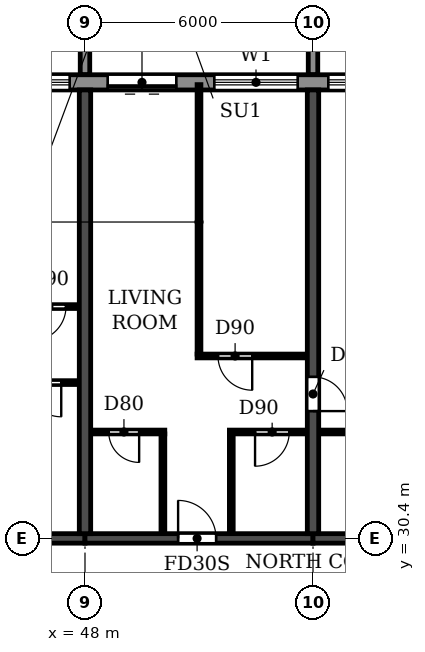
"""IFC4 building model, lengths in metres.
Left out: names, types, materials, properties, quantities, classifications, styles, units other than length and angle.
Written with IfcOpenShell. Run it as: python <this file> out.ifc"""

import sys

from ifc_helpers import new_model, si_unit, direction, frame, frame_2d, origin, place, context, subcontext, project, spatial, polyline, rectangle, outline, extrude, source, transform, mapped, element, fill, save


model = new_model("IFC4")
c1 = context("Model", 3, precision=1e-05, world=origin(), true_north=direction((0.0, 1.0)))
c2 = subcontext(c1, "Body", "Model", "MODEL_VIEW")
j1 = project(units=[si_unit("LENGTHUNIT", "METRE"), si_unit("PLANEANGLEUNIT", "RADIAN")], contexts=[c1])
p1 = place(None, origin())
s1 = spatial("IfcSite", under=j1, at=p1, CompositionType="ELEMENT")
p2 = place(p1, origin())
s2 = spatial("IfcBuilding", under=s1, at=p2, CompositionType="ELEMENT")
p3 = place(p2, frame((0.0, 0.0, 155.4)))
s3 = spatial("IfcBuildingStorey", under=s2, at=p3, CompositionType="ELEMENT", Elevation=155.4)
p4 = place(p3, frame((48.0, 30.525, 0.0), z_axis=(0.0, 0.0, 1.0), x_axis=(0.0, 1.0, 0.0)))
e1 = element("IfcWall", 1, at=p4, inside=s3, PredefinedType="SHEAR", context=c2, shape_type="SweptSolid", body=[
    extrude(rectangle(XDim=11.675, YDim=0.3, at=frame_2d((5.837, 0.0))), origin(), (0.0, 0.0, 1.0), 3.0),
])
p5 = place(p3, frame((54.0, 30.525, 0.0), z_axis=(0.0, 0.0, 1.0), x_axis=(0.0, 1.0, 0.0)))
e2 = element("IfcWall", 2, at=p5, inside=s3, PredefinedType="SHEAR", context=c2, shape_type="SweptSolid", body=[
    extrude(rectangle(XDim=11.675, YDim=0.3, at=frame_2d((5.837, 0.0))), origin(), (0.0, 0.0, 1.0), 3.0),
])
p6 = place(p5, frame((3.225, 0.0, 0.0)))
e3 = element("IfcOpeningElement", 3, at=p6, cuts=e2, PredefinedType="OPENING", context=c2, shape_type="SweptSolid", body=[
    extrude(rectangle(XDim=0.9, YDim=2.1, at=frame_2d((0.45, 1.05))), frame((0.0, 0.16, 0.0), z_axis=(0.0, -1.0, 0.0), x_axis=(1.0, 0.0, 0.0)), (0.0, 0.0, 1.0), 0.32),
])
p7 = place(p3, frame((42.0, 30.4, 0.0), z_axis=(0.0, 0.0, 1.0), x_axis=(1.0, 0.0, 0.0)))
e4 = element("IfcWall", 4, at=p7, inside=s3, PredefinedType="SHEAR", context=c2, shape_type="SweptSolid", body=[
    extrude(rectangle(XDim=6.0, YDim=0.25, at=frame_2d((3.0, 0.0))), origin(), (0.0, 0.0, 1.0), 2.4),
])
p8 = place(p7, frame((2.45, 0.0, 0.0)))
e5 = element("IfcOpeningElement", 5, at=p8, cuts=e4, PredefinedType="OPENING", context=c2, shape_type="SweptSolid", body=[
    extrude(rectangle(XDim=1.0, YDim=2.1, at=frame_2d((0.5, 1.05))), frame((0.0, 0.135, 0.0), z_axis=(0.0, -1.0, 0.0), x_axis=(1.0, 0.0, 0.0)), (0.0, 0.0, 1.0), 0.27),
])
p9 = place(p3, frame((48.0, 30.4, 0.0), z_axis=(0.0, 0.0, 1.0), x_axis=(1.0, 0.0, 0.0)))
e6 = element("IfcWall", 6, at=p9, inside=s3, PredefinedType="SHEAR", context=c2, shape_type="SweptSolid", body=[
    extrude(rectangle(XDim=6.0, YDim=0.25, at=frame_2d((3.0, 0.0))), origin(), (0.0, 0.0, 1.0), 2.4),
])
p10 = place(p9, frame((2.45, 0.0, 0.0)))
e7 = element("IfcOpeningElement", 7, at=p10, cuts=e6, PredefinedType="OPENING", context=c2, shape_type="SweptSolid", body=[
    extrude(rectangle(XDim=1.0, YDim=2.1, at=frame_2d((0.5, 1.05))), frame((0.0, 0.135, 0.0), z_axis=(0.0, -1.0, 0.0), x_axis=(1.0, 0.0, 0.0)), (0.0, 0.0, 1.0), 0.27),
])
p11 = place(p3, frame((54.0, 30.4, 0.0), z_axis=(0.0, 0.0, 1.0), x_axis=(1.0, 0.0, 0.0)))
e8 = element("IfcWall", 8, at=p11, inside=s3, PredefinedType="SHEAR", context=c2, shape_type="SweptSolid", body=[
    extrude(rectangle(XDim=6.0, YDim=0.25, at=frame_2d((3.0, 0.0))), origin(), (0.0, 0.0, 1.0), 2.4),
])
p12 = place(p3, frame((85.317, 42.4, 0.0), z_axis=(0.0, 0.0, 1.0), x_axis=(-1.0, 0.0, 0.0)))
e9 = element("IfcWall", 9, at=p12, inside=s3, PredefinedType="STANDARD", context=c2, shape_type="SweptSolid", body=[
    extrude(rectangle(XDim=68.634, YDim=0.4, at=frame_2d((34.317, 0.0))), origin(), (0.0, 0.0, 1.0), 3.0),
])
p13 = place(p12, frame((64.917, 0.0, 0.0)))
e10 = element("IfcOpeningElement", 10, at=p13, cuts=e9, PredefinedType="OPENING", context=c2, shape_type="SweptSolid", body=[
    extrude(rectangle(XDim=1.8, YDim=2.4, at=frame_2d((0.9, 1.2))), frame((0.0, 0.21, 0.0), z_axis=(0.0, -1.0, 0.0), x_axis=(1.0, 0.0, 0.0)), (0.0, 0.0, 1.0), 0.42),
])
p14 = place(p12, frame((61.717, 0.0, 0.9)))
e11 = element("IfcOpeningElement", 11, at=p14, cuts=e9, PredefinedType="OPENING", context=c2, shape_type="SweptSolid", body=[
    extrude(rectangle(XDim=2.2, YDim=1.5, at=frame_2d((1.1, 0.75))), frame((0.0, 0.21, 0.0), z_axis=(0.0, -1.0, 0.0), x_axis=(1.0, 0.0, 0.0)), (0.0, 0.0, 1.0), 0.42),
])
p15 = place(p12, frame((58.717, 0.0, 0.9)))
e12 = element("IfcOpeningElement", 12, at=p15, cuts=e9, PredefinedType="OPENING", context=c2, shape_type="SweptSolid", body=[
    extrude(rectangle(XDim=2.2, YDim=1.5, at=frame_2d((1.1, 0.75))), frame((0.0, 0.21, 0.0), z_axis=(0.0, -1.0, 0.0), x_axis=(1.0, 0.0, 0.0)), (0.0, 0.0, 1.0), 0.42),
])
p16 = place(p12, frame((55.917, 0.0, 0.0)))
e13 = element("IfcOpeningElement", 13, at=p16, cuts=e9, PredefinedType="OPENING", context=c2, shape_type="SweptSolid", body=[
    extrude(rectangle(XDim=1.8, YDim=2.4, at=frame_2d((0.9, 1.2))), frame((0.0, 0.21, 0.0), z_axis=(0.0, -1.0, 0.0), x_axis=(1.0, 0.0, 0.0)), (0.0, 0.0, 1.0), 0.42),
])
p17 = place(p12, frame((52.917, 0.0, 0.0)))
e14 = element("IfcOpeningElement", 14, at=p17, cuts=e9, PredefinedType="OPENING", context=c2, shape_type="SweptSolid", body=[
    extrude(rectangle(XDim=1.8, YDim=2.4, at=frame_2d((0.9, 1.2))), frame((0.0, 0.21, 0.0), z_axis=(0.0, -1.0, 0.0), x_axis=(1.0, 0.0, 0.0)), (0.0, 0.0, 1.0), 0.42),
])
p18 = place(p12, frame((49.717, 0.0, 0.9)))
e15 = element("IfcOpeningElement", 15, at=p18, cuts=e9, PredefinedType="OPENING", context=c2, shape_type="SweptSolid", body=[
    extrude(rectangle(XDim=2.2, YDim=1.5, at=frame_2d((1.1, 0.75))), frame((0.0, 0.21, 0.0), z_axis=(0.0, -1.0, 0.0), x_axis=(1.0, 0.0, 0.0)), (0.0, 0.0, 1.0), 0.42),
])
p19 = place(p12, frame((46.717, 0.0, 0.9)))
e16 = element("IfcOpeningElement", 16, at=p19, cuts=e9, PredefinedType="OPENING", context=c2, shape_type="SweptSolid", body=[
    extrude(rectangle(XDim=2.2, YDim=1.5, at=frame_2d((1.1, 0.75))), frame((0.0, 0.21, 0.0), z_axis=(0.0, -1.0, 0.0), x_axis=(1.0, 0.0, 0.0)), (0.0, 0.0, 1.0), 0.42),
])
p20 = place(p12, frame((43.717, 0.0, 0.9)))
e17 = element("IfcOpeningElement", 17, at=p20, cuts=e9, PredefinedType="OPENING", context=c2, shape_type="SweptSolid", body=[
    extrude(rectangle(XDim=2.2, YDim=1.5, at=frame_2d((1.1, 0.75))), frame((0.0, 0.21, 0.0), z_axis=(0.0, -1.0, 0.0), x_axis=(1.0, 0.0, 0.0)), (0.0, 0.0, 1.0), 0.42),
])
p21 = place(p12, frame((40.917, 0.0, 0.0)))
e18 = element("IfcOpeningElement", 18, at=p21, cuts=e9, PredefinedType="OPENING", context=c2, shape_type="SweptSolid", body=[
    extrude(rectangle(XDim=1.8, YDim=2.4, at=frame_2d((0.9, 1.2))), frame((0.0, 0.21, 0.0), z_axis=(0.0, -1.0, 0.0), x_axis=(1.0, 0.0, 0.0)), (0.0, 0.0, 1.0), 0.42),
])
p22 = place(p12, frame((37.717, 0.0, 0.9)))
e19 = element("IfcOpeningElement", 19, at=p22, cuts=e9, PredefinedType="OPENING", context=c2, shape_type="SweptSolid", body=[
    extrude(rectangle(XDim=2.2, YDim=1.5, at=frame_2d((1.1, 0.75))), frame((0.0, 0.21, 0.0), z_axis=(0.0, -1.0, 0.0), x_axis=(1.0, 0.0, 0.0)), (0.0, 0.0, 1.0), 0.42),
])
p23 = place(p12, frame((34.917, 0.0, 0.0)))
e20 = element("IfcOpeningElement", 20, at=p23, cuts=e9, PredefinedType="OPENING", context=c2, shape_type="SweptSolid", body=[
    extrude(rectangle(XDim=1.8, YDim=2.4, at=frame_2d((0.9, 1.2))), frame((0.0, 0.21, 0.0), z_axis=(0.0, -1.0, 0.0), x_axis=(1.0, 0.0, 0.0)), (0.0, 0.0, 1.0), 0.42),
])
p24 = place(p12, frame((31.717, 0.0, 0.9)))
e21 = element("IfcOpeningElement", 21, at=p24, cuts=e9, PredefinedType="OPENING", context=c2, shape_type="SweptSolid", body=[
    extrude(rectangle(XDim=2.2, YDim=1.5, at=frame_2d((1.1, 0.75))), frame((0.0, 0.21, 0.0), z_axis=(0.0, -1.0, 0.0), x_axis=(1.0, 0.0, 0.0)), (0.0, 0.0, 1.0), 0.42),
])
p25 = place(p12, frame((28.717, 0.0, 0.9)))
e22 = element("IfcOpeningElement", 22, at=p25, cuts=e9, PredefinedType="OPENING", context=c2, shape_type="SweptSolid", body=[
    extrude(rectangle(XDim=2.2, YDim=1.5, at=frame_2d((1.1, 0.75))), frame((0.0, 0.21, 0.0), z_axis=(0.0, -1.0, 0.0), x_axis=(1.0, 0.0, 0.0)), (0.0, 0.0, 1.0), 0.42),
])
p26 = place(p12, frame((25.717, 0.0, 0.9)))
e23 = element("IfcOpeningElement", 23, at=p26, cuts=e9, PredefinedType="OPENING", context=c2, shape_type="SweptSolid", body=[
    extrude(rectangle(XDim=2.2, YDim=1.5, at=frame_2d((1.1, 0.75))), frame((0.0, 0.21, 0.0), z_axis=(0.0, -1.0, 0.0), x_axis=(1.0, 0.0, 0.0)), (0.0, 0.0, 1.0), 0.42),
])
p27 = place(p12, frame((22.717, 0.0, 0.9)))
e24 = element("IfcOpeningElement", 24, at=p27, cuts=e9, PredefinedType="OPENING", context=c2, shape_type="SweptSolid", body=[
    extrude(rectangle(XDim=2.2, YDim=1.5, at=frame_2d((1.1, 0.75))), frame((0.0, 0.21, 0.0), z_axis=(0.0, -1.0, 0.0), x_axis=(1.0, 0.0, 0.0)), (0.0, 0.0, 1.0), 0.42),
])
p28 = place(p12, frame((19.917, 0.0, 0.0)))
e25 = element("IfcOpeningElement", 25, at=p28, cuts=e9, PredefinedType="OPENING", context=c2, shape_type="SweptSolid", body=[
    extrude(rectangle(XDim=1.8, YDim=2.4, at=frame_2d((0.9, 1.2))), frame((0.0, 0.21, 0.0), z_axis=(0.0, -1.0, 0.0), x_axis=(1.0, 0.0, 0.0)), (0.0, 0.0, 1.0), 0.42),
])
p29 = place(p12, frame((16.717, 0.0, 0.9)))
e26 = element("IfcOpeningElement", 26, at=p29, cuts=e9, PredefinedType="OPENING", context=c2, shape_type="SweptSolid", body=[
    extrude(rectangle(XDim=2.2, YDim=1.5, at=frame_2d((1.1, 0.75))), frame((0.0, 0.21, 0.0), z_axis=(0.0, -1.0, 0.0), x_axis=(1.0, 0.0, 0.0)), (0.0, 0.0, 1.0), 0.42),
])
p30 = place(p12, frame((13.717, 0.0, 0.9)))
e27 = element("IfcOpeningElement", 27, at=p30, cuts=e9, PredefinedType="OPENING", context=c2, shape_type="SweptSolid", body=[
    extrude(rectangle(XDim=2.2, YDim=1.5, at=frame_2d((1.1, 0.75))), frame((0.0, 0.21, 0.0), z_axis=(0.0, -1.0, 0.0), x_axis=(1.0, 0.0, 0.0)), (0.0, 0.0, 1.0), 0.42),
])
p31 = place(p12, frame((10.917, 0.0, 0.0)))
e28 = element("IfcOpeningElement", 28, at=p31, cuts=e9, PredefinedType="OPENING", context=c2, shape_type="SweptSolid", body=[
    extrude(rectangle(XDim=1.8, YDim=2.4, at=frame_2d((0.9, 1.2))), frame((0.0, 0.21, 0.0), z_axis=(0.0, -1.0, 0.0), x_axis=(1.0, 0.0, 0.0)), (0.0, 0.0, 1.0), 0.42),
])
p32 = place(p12, frame((7.717, 0.0, 0.9)))
e29 = element("IfcOpeningElement", 29, at=p32, cuts=e9, PredefinedType="OPENING", context=c2, shape_type="SweptSolid", body=[
    extrude(rectangle(XDim=2.2, YDim=1.5, at=frame_2d((1.1, 0.75))), frame((0.0, 0.21, 0.0), z_axis=(0.0, -1.0, 0.0), x_axis=(1.0, 0.0, 0.0)), (0.0, 0.0, 1.0), 0.42),
])
p33 = place(p12, frame((4.717, 0.0, 0.9)))
e30 = element("IfcOpeningElement", 30, at=p33, cuts=e9, PredefinedType="OPENING", context=c2, shape_type="SweptSolid", body=[
    extrude(rectangle(XDim=2.2, YDim=1.5, at=frame_2d((1.1, 0.75))), frame((0.0, 0.21, 0.0), z_axis=(0.0, -1.0, 0.0), x_axis=(1.0, 0.0, 0.0)), (0.0, 0.0, 1.0), 0.42),
])
p34 = place(p12, frame((1.917, 0.0, 0.0)))
e31 = element("IfcOpeningElement", 31, at=p34, cuts=e9, PredefinedType="OPENING", context=c2, shape_type="SweptSolid", body=[
    extrude(rectangle(XDim=1.8, YDim=2.4, at=frame_2d((0.9, 1.2))), frame((0.0, 0.21, 0.0), z_axis=(0.0, -1.0, 0.0), x_axis=(1.0, 0.0, 0.0)), (0.0, 0.0, 1.0), 0.42),
])
m1 = source(origin(), c2, "Body", "SweptSolid", [
    extrude(outline(polyline([(0.0, 0.0), (0.25, 0.0), (0.25, 3.1), (0.0, 3.1), (0.0, 0.0)])), origin(), (0.0, 0.0, 1.0), 3.1),
])
for number, where in (
    (32, (47.875, 42.6, 0.0)),
    (33, (53.875, 42.6, 0.0)),
):
    element("IfcWall", number, at=place(p3, frame(where)), inside=s3, PredefinedType="STANDARD", context=c2, shape_type="MappedRepresentation", body=[
        mapped(m1, transform((0.0, 0.0, 0.0))),
    ])
p35 = place(p3, frame((48.16, 33.2, 0.0), z_axis=(0.0, 0.0, 1.0), x_axis=(1.0, 0.0, 0.0)))
e34 = element("IfcWall", 34, at=p35, inside=s3, PredefinedType="PARTITIONING", context=c2, shape_type="SweptSolid", body=[
    extrude(rectangle(XDim=1.94, YDim=0.1, at=frame_2d((0.97, 0.0))), origin(), (0.0, 0.0, 1.0), 3.0),
])
p36 = place(p35, frame((0.465, 0.0, 0.0)))
e35 = element("IfcOpeningElement", 35, at=p36, cuts=e34, PredefinedType="OPENING", context=c2, shape_type="SweptSolid", body=[
    extrude(rectangle(XDim=0.8, YDim=2.1, at=frame_2d((0.4, 1.05))), frame((0.0, 0.06, 0.0), z_axis=(0.0, -1.0, 0.0), x_axis=(1.0, 0.0, 0.0)), (0.0, 0.0, 1.0), 0.12),
])
p37 = place(p3, frame((51.8, 33.2, 0.0), z_axis=(0.0, 0.0, 1.0), x_axis=(1.0, 0.0, 0.0)))
e36 = element("IfcWall", 36, at=p37, inside=s3, PredefinedType="PARTITIONING", context=c2, shape_type="SweptSolid", body=[
    extrude(rectangle(XDim=2.04, YDim=0.1, at=frame_2d((1.02, 0.0))), origin(), (0.0, 0.0, 1.0), 3.0),
])
p38 = place(p37, frame((0.675, 0.0, 0.0)))
e37 = element("IfcOpeningElement", 37, at=p38, cuts=e36, PredefinedType="OPENING", context=c2, shape_type="SweptSolid", body=[
    extrude(rectangle(XDim=0.9, YDim=2.1, at=frame_2d((0.45, 1.05))), frame((0.0, 0.06, 0.0), z_axis=(0.0, -1.0, 0.0), x_axis=(1.0, 0.0, 0.0)), (0.0, 0.0, 1.0), 0.12),
])
p39 = place(p3, frame((54.16, 33.2, 0.0), z_axis=(0.0, 0.0, 1.0), x_axis=(1.0, 0.0, 0.0)))
e38 = element("IfcWall", 38, at=p39, inside=s3, PredefinedType="PARTITIONING", context=c2, shape_type="SweptSolid", body=[
    extrude(rectangle(XDim=2.74, YDim=0.1, at=frame_2d((1.37, 0.0))), origin(), (0.0, 0.0, 1.0), 3.0),
])
p40 = place(p39, frame((0.94, 0.0, 0.0)))
e39 = element("IfcOpeningElement", 39, at=p40, cuts=e38, PredefinedType="OPENING", context=c2, shape_type="SweptSolid", body=[
    extrude(rectangle(XDim=0.8, YDim=2.1, at=frame_2d((0.4, 1.05))), frame((0.0, 0.06, 0.0), z_axis=(0.0, -1.0, 0.0), x_axis=(1.0, 0.0, 0.0)), (0.0, 0.0, 1.0), 0.12),
])
p41 = place(p3, frame((45.8, 34.5, 0.0), z_axis=(0.0, 0.0, 1.0), x_axis=(1.0, 0.0, 0.0)))
e40 = element("IfcWall", 40, at=p41, inside=s3, PredefinedType="PARTITIONING", context=c2, shape_type="SweptSolid", body=[
    extrude(rectangle(XDim=2.04, YDim=0.1, at=frame_2d((1.02, 0.0))), origin(), (0.0, 0.0, 1.0), 3.0),
])
p42 = place(p41, frame((0.675, 0.0, 0.0)))
e41 = element("IfcOpeningElement", 41, at=p42, cuts=e40, PredefinedType="OPENING", context=c2, shape_type="SweptSolid", body=[
    extrude(rectangle(XDim=0.9, YDim=2.1, at=frame_2d((0.45, 1.05))), frame((0.0, 0.06, 0.0), z_axis=(0.0, -1.0, 0.0), x_axis=(1.0, 0.0, 0.0)), (0.0, 0.0, 1.0), 0.12),
])
p43 = place(p3, frame((50.95, 35.2, 0.0), z_axis=(0.0, 0.0, 1.0), x_axis=(1.0, 0.0, 0.0)))
e42 = element("IfcWall", 42, at=p43, inside=s3, PredefinedType="PARTITIONING", context=c2, shape_type="SweptSolid", body=[
    extrude(rectangle(XDim=2.89, YDim=0.1, at=frame_2d((1.445, 0.0))), origin(), (0.0, 0.0, 1.0), 3.0),
])
p44 = place(p43, frame((0.55, 0.0, 0.0)))
e43 = element("IfcOpeningElement", 43, at=p44, cuts=e42, PredefinedType="OPENING", context=c2, shape_type="SweptSolid", body=[
    extrude(rectangle(XDim=0.9, YDim=2.1, at=frame_2d((0.45, 1.05))), frame((0.0, 0.06, 0.0), z_axis=(0.0, -1.0, 0.0), x_axis=(1.0, 0.0, 0.0)), (0.0, 0.0, 1.0), 0.12),
])
p45 = place(p3, frame((44.95, 36.5, 0.0), z_axis=(0.0, 0.0, 1.0), x_axis=(1.0, 0.0, 0.0)))
e44 = element("IfcWall", 44, at=p45, inside=s3, PredefinedType="PARTITIONING", context=c2, shape_type="SweptSolid", body=[
    extrude(rectangle(XDim=2.89, YDim=0.1, at=frame_2d((1.445, 0.0))), origin(), (0.0, 0.0, 1.0), 3.0),
])
p46 = place(p45, frame((1.65, 0.0, 0.0)))
e45 = element("IfcOpeningElement", 45, at=p46, cuts=e44, PredefinedType="OPENING", context=c2, shape_type="SweptSolid", body=[
    extrude(rectangle(XDim=0.9, YDim=2.1, at=frame_2d((0.45, 1.05))), frame((0.0, 0.06, 0.0), z_axis=(0.0, -1.0, 0.0), x_axis=(1.0, 0.0, 0.0)), (0.0, 0.0, 1.0), 0.12),
])
p47 = place(p3, frame((50.05, 30.535, 0.0), z_axis=(0.0, 0.0, 1.0), x_axis=(0.0, 1.0, 0.0)))
e46 = element("IfcWall", 46, at=p47, inside=s3, PredefinedType="PARTITIONING", context=c2, shape_type="SweptSolid", body=[
    extrude(rectangle(XDim=2.615, YDim=0.1, at=frame_2d((1.308, 0.0))), origin(), (0.0, 0.0, 1.0), 3.0),
])
p48 = place(p3, frame((51.0, 35.25, 0.0), z_axis=(0.0, 0.0, 1.0), x_axis=(0.0, 1.0, 0.0)))
e47 = element("IfcWall", 47, at=p48, inside=s3, PredefinedType="PARTITIONING", context=c2, shape_type="SweptSolid", body=[
    extrude(rectangle(XDim=7.09, YDim=0.1, at=frame_2d((3.545, 0.0))), origin(), (0.0, 0.0, 1.0), 3.0),
])
p49 = place(p3, frame((51.85, 30.535, 0.0), z_axis=(0.0, 0.0, 1.0), x_axis=(0.0, 1.0, 0.0)))
e48 = element("IfcWall", 48, at=p49, inside=s3, PredefinedType="PARTITIONING", context=c2, shape_type="SweptSolid", body=[
    extrude(rectangle(XDim=2.615, YDim=0.1, at=frame_2d((1.308, 0.0))), origin(), (0.0, 0.0, 1.0), 3.0),
])
p50 = place(p22, origin())
e49 = element("IfcWindow", 49, at=p50, inside=s3, PartitioningType="DOUBLE_PANEL_HORIZONTAL", PredefinedType="WINDOW", context=c2, shape_type="SweptSolid", body=[
    extrude(rectangle(XDim=2.2, YDim=1.5, at=frame_2d((1.1, 0.75))), frame((0.0, 0.03, 0.0), z_axis=(0.0, -1.0, 0.0), x_axis=(1.0, 0.0, 0.0)), (0.0, 0.0, 1.0), 0.06),
])
fill(e19, e49)
p51 = place(p23, origin())
e50 = element("IfcDoor", 50, at=p51, inside=s3, OperationType="DOUBLE_DOOR_SLIDING", PredefinedType="DOOR", context=c2, shape_type="SweptSolid", body=[
    extrude(rectangle(XDim=1.8, YDim=2.4, at=frame_2d((0.9, 1.2))), frame((0.0, 0.025, 0.0), z_axis=(0.0, -1.0, 0.0), x_axis=(1.0, 0.0, 0.0)), (0.0, 0.0, 1.0), 0.05),
])
fill(e20, e50)
p52 = place(p24, origin())
e51 = element("IfcWindow", 51, at=p52, inside=s3, PartitioningType="DOUBLE_PANEL_HORIZONTAL", PredefinedType="WINDOW", context=c2, shape_type="SweptSolid", body=[
    extrude(rectangle(XDim=2.2, YDim=1.5, at=frame_2d((1.1, 0.75))), frame((0.0, 0.03, 0.0), z_axis=(0.0, -1.0, 0.0), x_axis=(1.0, 0.0, 0.0)), (0.0, 0.0, 1.0), 0.06),
])
fill(e21, e51)
p53 = place(p25, origin())
e52 = element("IfcWindow", 52, at=p53, inside=s3, PartitioningType="DOUBLE_PANEL_HORIZONTAL", PredefinedType="WINDOW", context=c2, shape_type="SweptSolid", body=[
    extrude(rectangle(XDim=2.2, YDim=1.5, at=frame_2d((1.1, 0.75))), frame((0.0, 0.03, 0.0), z_axis=(0.0, -1.0, 0.0), x_axis=(1.0, 0.0, 0.0)), (0.0, 0.0, 1.0), 0.06),
])
fill(e22, e52)
p54 = place(p42, frame((0.9, 0.0, 0.0), z_axis=(0.0, 0.0, 1.0), x_axis=(-1.0, 0.0, 0.0)))
e53 = element("IfcDoor", 53, at=p54, inside=s3, OperationType="SINGLE_SWING_LEFT", PredefinedType="DOOR", context=c2, shape_type="SweptSolid", body=[
    extrude(rectangle(XDim=0.9, YDim=2.1, at=frame_2d((0.45, 1.05))), frame((0.0, 0.025, 0.0), z_axis=(0.0, -1.0, 0.0), x_axis=(1.0, 0.0, 0.0)), (0.0, 0.0, 1.0), 0.05),
])
fill(e41, e53)
p55 = place(p46, frame((0.9, 0.0, 0.0), z_axis=(0.0, 0.0, 1.0), x_axis=(-1.0, 0.0, 0.0)))
e54 = element("IfcDoor", 54, at=p55, inside=s3, OperationType="SINGLE_SWING_RIGHT", PredefinedType="DOOR", context=c2, shape_type="SweptSolid", body=[
    extrude(rectangle(XDim=0.9, YDim=2.1, at=frame_2d((0.45, 1.05))), frame((0.0, 0.025, 0.0), z_axis=(0.0, -1.0, 0.0), x_axis=(1.0, 0.0, 0.0)), (0.0, 0.0, 1.0), 0.05),
])
fill(e45, e54)
p56 = place(p36, frame((0.8, 0.0, 0.0), z_axis=(0.0, 0.0, 1.0), x_axis=(-1.0, 0.0, 0.0)))
e55 = element("IfcDoor", 55, at=p56, inside=s3, OperationType="SINGLE_SWING_LEFT", PredefinedType="DOOR", context=c2, shape_type="SweptSolid", body=[
    extrude(rectangle(XDim=0.8, YDim=2.1, at=frame_2d((0.4, 1.05))), frame((0.0, 0.025, 0.0), z_axis=(0.0, -1.0, 0.0), x_axis=(1.0, 0.0, 0.0)), (0.0, 0.0, 1.0), 0.05),
])
fill(e35, e55)
p57 = place(p10, origin())
e56 = element("IfcDoor", 56, at=p57, inside=s3, OperationType="SINGLE_SWING_LEFT", PredefinedType="DOOR", context=c2, shape_type="SweptSolid", body=[
    extrude(rectangle(XDim=1.0, YDim=2.1, at=frame_2d((0.5, 1.05))), frame((0.0, 0.025, 0.0), z_axis=(0.0, -1.0, 0.0), x_axis=(1.0, 0.0, 0.0)), (0.0, 0.0, 1.0), 0.05),
])
fill(e7, e56)
p58 = place(p44, frame((0.9, 0.0, 0.0), z_axis=(0.0, 0.0, 1.0), x_axis=(-1.0, 0.0, 0.0)))
e57 = element("IfcDoor", 57, at=p58, inside=s3, OperationType="SINGLE_SWING_LEFT", PredefinedType="DOOR", context=c2, shape_type="SweptSolid", body=[
    extrude(rectangle(XDim=0.9, YDim=2.1, at=frame_2d((0.45, 1.05))), frame((0.0, 0.025, 0.0), z_axis=(0.0, -1.0, 0.0), x_axis=(1.0, 0.0, 0.0)), (0.0, 0.0, 1.0), 0.05),
])
fill(e43, e57)
p59 = place(p38, frame((0.9, 0.0, 0.0), z_axis=(0.0, 0.0, 1.0), x_axis=(-1.0, 0.0, 0.0)))
e58 = element("IfcDoor", 58, at=p59, inside=s3, OperationType="SINGLE_SWING_RIGHT", PredefinedType="DOOR", context=c2, shape_type="SweptSolid", body=[
    extrude(rectangle(XDim=0.9, YDim=2.1, at=frame_2d((0.45, 1.05))), frame((0.0, 0.025, 0.0), z_axis=(0.0, -1.0, 0.0), x_axis=(1.0, 0.0, 0.0)), (0.0, 0.0, 1.0), 0.05),
])
fill(e37, e58)
p60 = place(p6, frame((0.9, 0.0, 0.0), z_axis=(0.0, 0.0, 1.0), x_axis=(-1.0, 0.0, 0.0)))
e59 = element("IfcDoor", 59, at=p60, inside=s3, OperationType="SINGLE_SWING_RIGHT", PredefinedType="DOOR", context=c2, shape_type="SweptSolid", body=[
    extrude(rectangle(XDim=0.9, YDim=2.1, at=frame_2d((0.45, 1.05))), frame((0.0, 0.025, 0.0), z_axis=(0.0, -1.0, 0.0), x_axis=(1.0, 0.0, 0.0)), (0.0, 0.0, 1.0), 0.05),
])
fill(e3, e59)
save(model, sys.argv[1])
